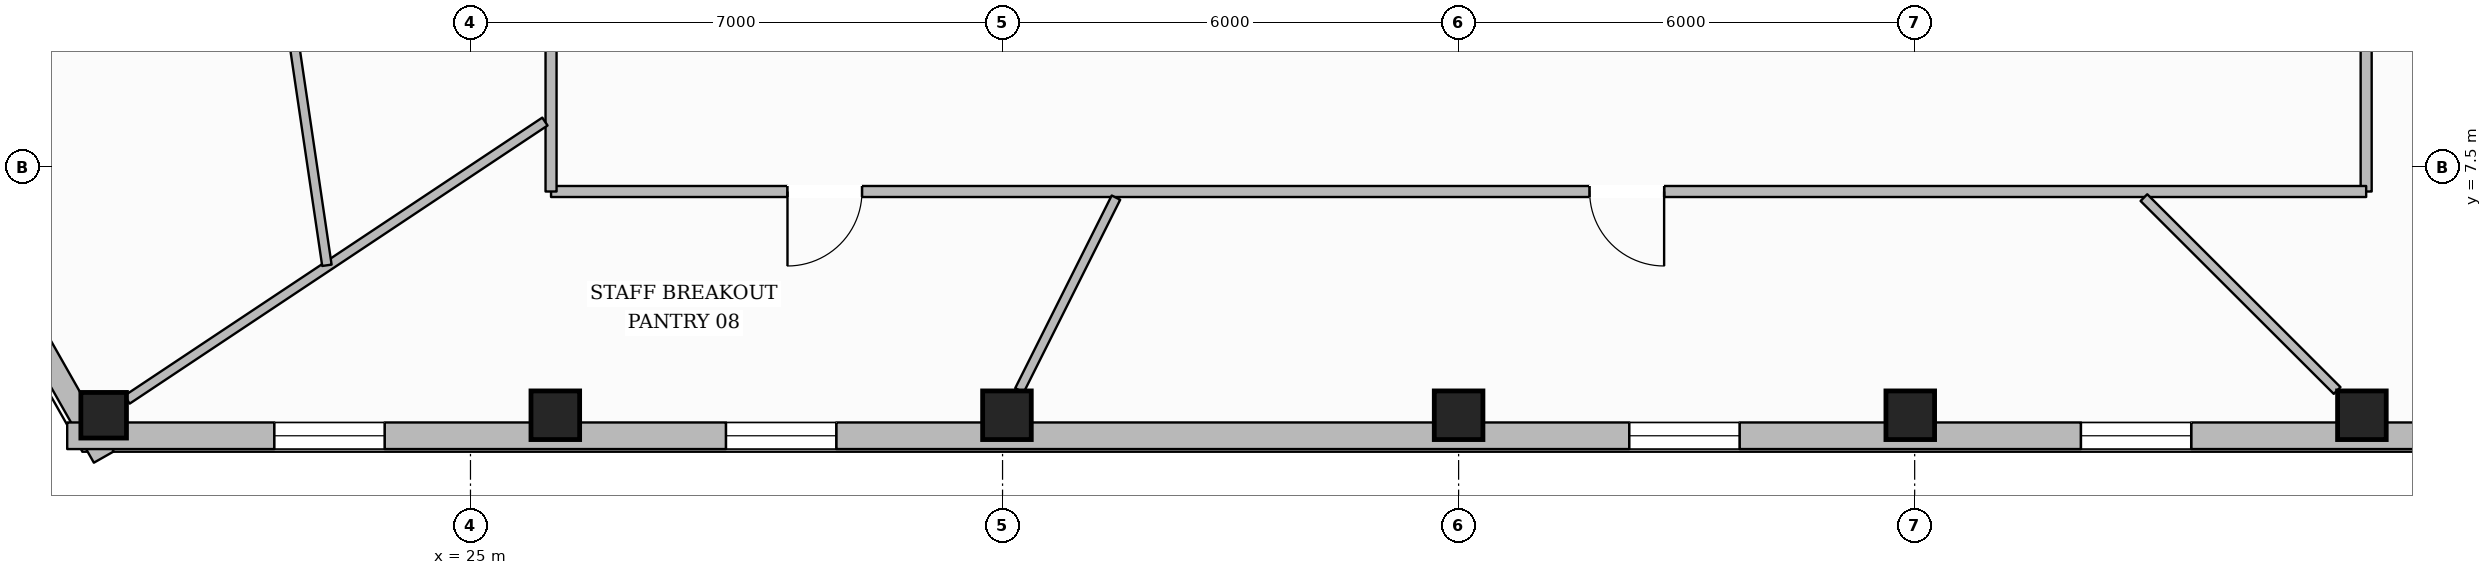
"""IFC4 building model, lengths in metres.
Left out: names, types, materials, properties, quantities, classifications, styles, units other than length and angle.
Written with IfcOpenShell. Run it as: python <this file> out.ifc"""

import sys

from ifc_helpers import new_model, si_unit, direction, frame, frame_2d, origin, origin_2d, place, context, subcontext, project, spatial, rectangle, hollow_rectangle, extrude, element, fill, save


model = new_model("IFC4")
c1 = context("Model", 3, precision=1e-05, world=origin(), true_north=direction((0.0, 1.0)))
c2 = subcontext(c1, "Body", "Model", "MODEL_VIEW")
j1 = project(units=[si_unit("LENGTHUNIT", "METRE"), si_unit("PLANEANGLEUNIT", "RADIAN")], contexts=[c1])
p1 = place(None, origin())
s1 = spatial("IfcSite", under=j1, at=p1, CompositionType="ELEMENT")
p2 = place(p1, origin())
s2 = spatial("IfcBuilding", under=s1, at=p2, CompositionType="ELEMENT")
p3 = place(p2, frame((0.0, 0.0, 165.0)))
s3 = spatial("IfcBuildingStorey", under=s2, at=p3, CompositionType="ELEMENT", Elevation=165.0)
p4 = place(p3, frame((20.174, 4.237, 0.0), z_axis=(0.0, 0.0, 1.0), x_axis=(1.0, 0.0, 0.0)))
e1 = element("IfcColumn", 1, at=p4, inside=s3, PredefinedType="COLUMN", context=c2, shape_type="SweptSolid", body=[
    extrude(hollow_rectangle(XDim=0.6, YDim=0.6, WallThickness=0.028, at=origin_2d()), origin(), (0.0, 0.0, 1.0), 3.6),
])
for number, where, z_axis, x_axis in (
    (2, (26.116, 4.237, 0.0), (0.0, 0.0, 1.0), (1.0, 0.0, 0.0)),
    (3, (32.058, 4.237, 0.0), (0.0, 0.0, 1.0), (1.0, 0.0, 0.0)),
    (4, (38.0, 4.237, 0.0), (0.0, 0.0, 1.0), (1.0, 0.0, 0.0)),
    (5, (43.942, 4.237, 0.0), (0.0, 0.0, 1.0), (1.0, 0.0, 0.0)),
    (6, (49.884, 4.237, 0.0), (0.0, 0.0, 1.0), (1.0, 0.0, 0.0)),
):
    element("IfcColumn", number, at=place(p3, frame(where, z_axis=z_axis, x_axis=x_axis)), inside=s3, PredefinedType="COLUMN", context=c2, shape_type="SweptSolid", body=[
        extrude(hollow_rectangle(XDim=0.64, YDim=0.64, WallThickness=0.028, at=origin_2d()), origin(), (0.0, 0.0, 1.0), 3.6),
    ])
p5 = place(p3, frame((20.176, 3.686, 0.0), z_axis=(0.0, 0.0, 1.0), x_axis=(-0.493371164069, 0.869818886013, 0.0)))
e7 = element("IfcWall", 7, at=p5, inside=s3, PredefinedType="STANDARD", context=c2, shape_type="SweptSolid", body=[
    extrude(rectangle(XDim=10.563, YDim=0.3, at=frame_2d((5.282, 0.0))), origin(), (0.0, 0.0, 1.0), 3.132),
])
p6 = place(p5, frame((4.757, 0.0, 0.65)))
e8 = element("IfcOpeningElement", 8, at=p6, cuts=e7, PredefinedType="OPENING", context=c2, shape_type="SweptSolid", body=[
    extrude(rectangle(XDim=1.05, YDim=1.7, at=frame_2d((0.525, 0.85))), frame((0.0, 0.16, 0.0), z_axis=(0.0, -1.0, 0.0), x_axis=(1.0, 0.0, 0.0)), (0.0, 0.0, 1.0), 0.32),
])
p7 = place(p3, frame((56.305, 3.967, 0.0), z_axis=(0.0, 0.0, 1.0), x_axis=(-1.0, 0.0, 0.0)))
e9 = element("IfcWall", 9, at=p7, inside=s3, PredefinedType="STANDARD", context=c2, shape_type="SweptSolid", body=[
    extrude(rectangle(XDim=36.611, YDim=0.35, at=frame_2d((18.305, 0.0))), origin(), (0.0, 0.0, 1.0), 3.132),
])
p8 = place(p7, frame((32.435, 0.0, 0.65)))
e10 = element("IfcOpeningElement", 10, at=p8, cuts=e9, PredefinedType="OPENING", context=c2, shape_type="SweptSolid", body=[
    extrude(rectangle(XDim=1.45, YDim=1.75, at=frame_2d((0.725, 0.875))), frame((0.0, 0.185, 0.0), z_axis=(0.0, -1.0, 0.0), x_axis=(1.0, 0.0, 0.0)), (0.0, 0.0, 1.0), 0.37),
])
p9 = place(p7, frame((26.493, 0.0, 0.65)))
e11 = element("IfcOpeningElement", 11, at=p9, cuts=e9, PredefinedType="OPENING", context=c2, shape_type="SweptSolid", body=[
    extrude(rectangle(XDim=1.45, YDim=1.75, at=frame_2d((0.725, 0.875))), frame((0.0, 0.185, 0.0), z_axis=(0.0, -1.0, 0.0), x_axis=(1.0, 0.0, 0.0)), (0.0, 0.0, 1.0), 0.37),
])
p10 = place(p7, frame((14.61, 0.0, 0.65)))
e12 = element("IfcOpeningElement", 12, at=p10, cuts=e9, PredefinedType="OPENING", context=c2, shape_type="SweptSolid", body=[
    extrude(rectangle(XDim=1.45, YDim=1.75, at=frame_2d((0.725, 0.875))), frame((0.0, 0.185, 0.0), z_axis=(0.0, -1.0, 0.0), x_axis=(1.0, 0.0, 0.0)), (0.0, 0.0, 1.0), 0.37),
])
p11 = place(p7, frame((8.667, 0.0, 0.65)))
e13 = element("IfcOpeningElement", 13, at=p11, cuts=e9, PredefinedType="OPENING", context=c2, shape_type="SweptSolid", body=[
    extrude(rectangle(XDim=1.45, YDim=1.75, at=frame_2d((0.725, 0.875))), frame((0.0, 0.185, 0.0), z_axis=(0.0, -1.0, 0.0), x_axis=(1.0, 0.0, 0.0)), (0.0, 0.0, 1.0), 0.37),
])
p12 = place(p7, frame((2.726, 0.0, 0.65)))
e14 = element("IfcOpeningElement", 14, at=p12, cuts=e9, PredefinedType="OPENING", context=c2, shape_type="SweptSolid", body=[
    extrude(rectangle(XDim=1.45, YDim=1.75, at=frame_2d((0.725, 0.875))), frame((0.0, 0.185, 0.0), z_axis=(0.0, -1.0, 0.0), x_axis=(1.0, 0.0, 0.0)), (0.0, 0.0, 1.0), 0.37),
])
p13 = place(p3, frame((49.94, 15.1, 0.0), z_axis=(0.0, 0.0, 1.0), x_axis=(0.0, -1.0, 0.0)))
e15 = element("IfcWall", 15, at=p13, inside=s3, PredefinedType="PARTITIONING", context=c2, shape_type="SweptSolid", body=[
    extrude(rectangle(XDim=7.92, YDim=0.145, at=frame_2d((3.96, 0.0))), origin(), (0.0, 0.0, 1.0), 3.6),
])
p14 = place(p13, frame((3.45, 0.0, 0.0)))
e16 = element("IfcOpeningElement", 16, at=p14, cuts=e15, PredefinedType="OPENING", context=c2, shape_type="SweptSolid", body=[
    extrude(rectangle(XDim=1.02, YDim=2.15, at=frame_2d((0.51, 1.075))), frame((0.0, 0.083, 0.0), z_axis=(0.0, -1.0, 0.0), x_axis=(1.0, 0.0, 0.0)), (0.0, 0.0, 1.0), 0.165),
])
p15 = place(p3, frame((49.94, 7.18, 0.0), z_axis=(0.0, 0.0, 1.0), x_axis=(-1.0, 0.0, 0.0)))
e17 = element("IfcWall", 17, at=p15, inside=s3, PredefinedType="PARTITIONING", context=c2, shape_type="SweptSolid", body=[
    extrude(rectangle(XDim=23.88, YDim=0.145, at=frame_2d((11.94, 0.0))), origin(), (0.0, 0.0, 1.0), 3.6),
])
p16 = place(p15, frame((19.789, 0.0, 0.0)))
e18 = element("IfcOpeningElement", 18, at=p16, cuts=e17, PredefinedType="OPENING", context=c2, shape_type="SweptSolid", body=[
    extrude(rectangle(XDim=0.98, YDim=2.15, at=frame_2d((0.49, 1.075))), frame((0.0, 0.083, 0.0), z_axis=(0.0, -1.0, 0.0), x_axis=(1.0, 0.0, 0.0)), (0.0, 0.0, 1.0), 0.165),
])
p17 = place(p15, frame((9.236, 0.0, 0.0)))
e19 = element("IfcOpeningElement", 19, at=p17, cuts=e17, PredefinedType="OPENING", context=c2, shape_type="SweptSolid", body=[
    extrude(rectangle(XDim=0.98, YDim=2.15, at=frame_2d((0.49, 1.075))), frame((0.0, 0.083, 0.0), z_axis=(0.0, -1.0, 0.0), x_axis=(1.0, 0.0, 0.0)), (0.0, 0.0, 1.0), 0.165),
])
p18 = place(p3, frame((26.06, 7.18, 0.0), z_axis=(0.0, 0.0, 1.0), x_axis=(0.0, 1.0, 0.0)))
e20 = element("IfcWall", 20, at=p18, inside=s3, PredefinedType="PARTITIONING", context=c2, shape_type="SweptSolid", body=[
    extrude(rectangle(XDim=4.97, YDim=0.145, at=frame_2d((2.485, 0.0))), origin(), (0.0, 0.0, 1.0), 3.6),
])
p19 = place(p18, frame((2.185, 0.0, 0.0)))
e21 = element("IfcOpeningElement", 21, at=p19, cuts=e20, PredefinedType="OPENING", context=c2, shape_type="SweptSolid", body=[
    extrude(rectangle(XDim=1.4, YDim=2.2, at=frame_2d((0.7, 1.1))), frame((0.0, 0.083, 0.0), z_axis=(0.0, -1.0, 0.0), x_axis=(1.0, 0.0, 0.0)), (0.0, 0.0, 1.0), 0.165),
])
p20 = place(p3, frame((25.979, 8.1, 0.0), z_axis=(0.0, 0.0, 1.0), x_axis=(-0.832482321267, -0.554051608407, 0.0)))
e22 = element("IfcWall", 22, at=p20, inside=s3, PredefinedType="PARTITIONING", context=c2, shape_type="SweptSolid", body=[
    extrude(rectangle(XDim=6.604, YDim=0.125, at=frame_2d((3.302, 0.0))), origin(), (0.0, 0.0, 1.0), 3.141),
])
p21 = place(p3, frame((33.492, 7.1, 0.0), z_axis=(0.0, 0.0, 1.0), x_axis=(-0.447764605511, -0.894151473774, 0.0)))
e23 = element("IfcWall", 23, at=p21, inside=s3, PredefinedType="PARTITIONING", context=c2, shape_type="SweptSolid", body=[
    extrude(rectangle(XDim=2.835, YDim=0.125, at=frame_2d((1.417, 0.0))), origin(), (0.0, 0.0, 1.0), 3.6),
])
p22 = place(p3, frame((47.016, 7.1, 0.0), z_axis=(0.0, 0.0, 1.0), x_axis=(0.707718259203, -0.70649477393, 0.0)))
e24 = element("IfcWall", 24, at=p22, inside=s3, PredefinedType="PARTITIONING", context=c2, shape_type="SweptSolid", body=[
    extrude(rectangle(XDim=3.592, YDim=0.125, at=frame_2d((1.796, 0.0))), origin(), (0.0, 0.0, 1.0), 3.6),
])
p23 = place(p3, frame((20.75, 22.215, 0.0), z_axis=(0.0, 0.0, 1.0), x_axis=(0.145949252276, -0.989292078084, 0.0)))
e25 = element("IfcWall", 25, at=p23, inside=s3, PredefinedType="PARTITIONING", context=c2, shape_type="SweptSolid", body=[
    extrude(rectangle(XDim=16.179, YDim=0.125, at=frame_2d((8.09, 0.0))), origin(), (0.0, 0.0, 1.0), 3.339),
])
p24 = place(p23, frame((7.485, 0.0, 0.0)))
e26 = element("IfcOpeningElement", 26, at=p24, cuts=e25, PredefinedType="OPENING", context=c2, shape_type="SweptSolid", body=[
    extrude(rectangle(XDim=0.98, YDim=2.15, at=frame_2d((0.49, 1.075))), frame((0.0, 0.073, 0.0), z_axis=(0.0, -1.0, 0.0), x_axis=(1.0, 0.0, 0.0)), (0.0, 0.0, 1.0), 0.145),
])
p25 = place(p8, origin())
e27 = element("IfcWindow", 27, at=p25, inside=s3, PartitioningType="SINGLE_PANEL", PredefinedType="WINDOW", context=c2, shape_type="SweptSolid", body=[
    extrude(rectangle(XDim=1.45, YDim=1.75, at=frame_2d((0.725, 0.875))), frame((0.0, 0.03, 0.0), z_axis=(0.0, -1.0, 0.0), x_axis=(1.0, 0.0, 0.0)), (0.0, 0.0, 1.0), 0.06),
])
fill(e10, e27)
p26 = place(p9, origin())
e28 = element("IfcWindow", 28, at=p26, inside=s3, PartitioningType="SINGLE_PANEL", PredefinedType="WINDOW", context=c2, shape_type="SweptSolid", body=[
    extrude(rectangle(XDim=1.45, YDim=1.75, at=frame_2d((0.725, 0.875))), frame((0.0, 0.03, 0.0), z_axis=(0.0, -1.0, 0.0), x_axis=(1.0, 0.0, 0.0)), (0.0, 0.0, 1.0), 0.06),
])
fill(e11, e28)
p27 = place(p10, origin())
e29 = element("IfcWindow", 29, at=p27, inside=s3, PartitioningType="SINGLE_PANEL", PredefinedType="WINDOW", context=c2, shape_type="SweptSolid", body=[
    extrude(rectangle(XDim=1.45, YDim=1.75, at=frame_2d((0.725, 0.875))), frame((0.0, 0.03, 0.0), z_axis=(0.0, -1.0, 0.0), x_axis=(1.0, 0.0, 0.0)), (0.0, 0.0, 1.0), 0.06),
])
fill(e12, e29)
p28 = place(p11, origin())
e30 = element("IfcWindow", 30, at=p28, inside=s3, PartitioningType="SINGLE_PANEL", PredefinedType="WINDOW", context=c2, shape_type="SweptSolid", body=[
    extrude(rectangle(XDim=1.45, YDim=1.75, at=frame_2d((0.725, 0.875))), frame((0.0, 0.03, 0.0), z_axis=(0.0, -1.0, 0.0), x_axis=(1.0, 0.0, 0.0)), (0.0, 0.0, 1.0), 0.06),
])
fill(e13, e30)
p29 = place(p16, origin())
e31 = element("IfcDoor", 31, at=p29, inside=s3, OperationType="SINGLE_SWING_RIGHT", PredefinedType="DOOR", context=c2, shape_type="SweptSolid", body=[
    extrude(rectangle(XDim=0.98, YDim=2.15, at=frame_2d((0.49, 1.075))), frame((0.0, 0.025, 0.0), z_axis=(0.0, -1.0, 0.0), x_axis=(1.0, 0.0, 0.0)), (0.0, 0.0, 1.0), 0.05),
])
fill(e18, e31)
p30 = place(p17, origin())
e32 = element("IfcDoor", 32, at=p30, inside=s3, OperationType="SINGLE_SWING_LEFT", PredefinedType="DOOR", context=c2, shape_type="SweptSolid", body=[
    extrude(rectangle(XDim=0.98, YDim=2.15, at=frame_2d((0.49, 1.075))), frame((0.0, 0.025, 0.0), z_axis=(0.0, -1.0, 0.0), x_axis=(1.0, 0.0, 0.0)), (0.0, 0.0, 1.0), 0.05),
])
fill(e19, e32)
save(model, sys.argv[1])
